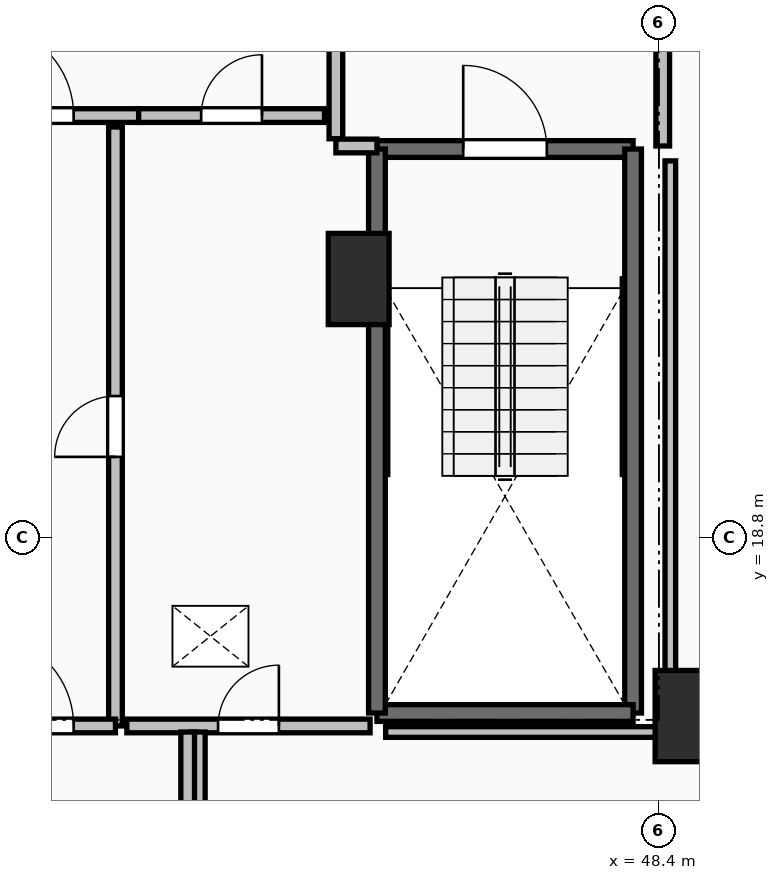
"""IFC4 building model, lengths in metres.
Left out: names, types, materials, properties, quantities, classifications, styles, units other than length and angle.
Written with IfcOpenShell. Run it as: python <this file> out.ifc"""

import sys

from ifc_helpers import new_model, si_unit, direction, frame, frame_2d, origin, origin_2d, place, context, subcontext, project, spatial, rectangle, extrude, element, fill, save


model = new_model("IFC4")
c1 = context("Model", 3, precision=1e-05, world=origin(), true_north=direction((0.0, 1.0)))
c2 = subcontext(c1, "Body", "Model", "MODEL_VIEW")
j1 = project(units=[si_unit("LENGTHUNIT", "METRE"), si_unit("PLANEANGLEUNIT", "RADIAN")], contexts=[c1])
p1 = place(None, origin())
s1 = spatial("IfcSite", under=j1, at=p1, CompositionType="ELEMENT")
p2 = place(p1, origin())
s2 = spatial("IfcBuilding", under=s1, at=p2, CompositionType="ELEMENT")
p3 = place(p2, frame((0.0, 0.0, 27.5)))
s3 = spatial("IfcBuildingStorey", under=s2, at=p3, CompositionType="ELEMENT", Elevation=27.5)
for number, where, z_axis, x_axis in (
    (1, (48.75, 16.45, 0.0), (0.0, 0.0, 1.0), (1.0, 0.0, 0.0)),
    (2, (44.45, 22.2, 0.0), (0.0, 0.0, 1.0), (1.0, 0.0, 0.0)),
):
    element("IfcColumn", number, at=place(p3, frame(where, z_axis=z_axis, x_axis=x_axis)), inside=s3, PredefinedType="PILASTER", context=c2, shape_type="SweptSolid", body=[
        extrude(rectangle(XDim=0.8, YDim=1.2, at=origin_2d()), origin(), (0.0, 0.0, 1.0), 3.5),
    ])
p4 = place(p3, frame((44.69, 23.91, 0.0), z_axis=(0.0, 0.0, 1.0), x_axis=(1.0, 0.0, 0.0)))
e3 = element("IfcWall", 3, at=p4, inside=s3, PredefinedType="SOLIDWALL", context=c2, shape_type="SweptSolid", body=[
    extrude(rectangle(XDim=3.37, YDim=0.22, at=frame_2d((1.685, 0.0))), origin(), (0.0, 0.0, 1.0), 3.24),
])
p5 = place(p4, frame((1.135, 0.0, 0.0)))
e4 = element("IfcOpeningElement", 4, at=p5, cuts=e3, PredefinedType="OPENING", context=c2, shape_type="SweptSolid", body=[
    extrude(rectangle(XDim=1.1, YDim=2.15, at=frame_2d((0.55, 1.075))), frame((0.0, 0.125, 0.0), z_axis=(0.0, -1.0, 0.0), x_axis=(1.0, 0.0, 0.0)), (0.0, 0.0, 1.0), 0.25),
])
p6 = place(p3, frame((48.06, 23.91, 0.0), z_axis=(0.0, 0.0, 1.0), x_axis=(0.0, -1.0, 0.0)))
e5 = element("IfcWall", 5, at=p6, inside=s3, PredefinedType="SOLIDWALL", context=c2, shape_type="SweptSolid", body=[
    extrude(rectangle(XDim=7.42, YDim=0.22, at=frame_2d((3.71, 0.0))), origin(), (0.0, 0.0, 1.0), 3.24),
])
p7 = place(p3, frame((48.06, 16.49, 0.0), z_axis=(0.0, 0.0, 1.0), x_axis=(-1.0, 0.0, 0.0)))
e6 = element("IfcWall", 6, at=p7, inside=s3, PredefinedType="SOLIDWALL", context=c2, shape_type="SweptSolid", body=[
    extrude(rectangle(XDim=3.37, YDim=0.22, at=frame_2d((1.685, 0.0))), origin(), (0.0, 0.0, 1.0), 3.24),
])
p8 = place(p3, frame((44.69, 16.49, 0.0), z_axis=(0.0, 0.0, 1.0), x_axis=(0.0, 1.0, 0.0)))
e7 = element("IfcWall", 7, at=p8, inside=s3, PredefinedType="SOLIDWALL", context=c2, shape_type="SweptSolid", body=[
    extrude(rectangle(XDim=7.42, YDim=0.22, at=frame_2d((3.71, 0.0))), origin(), (0.0, 0.0, 1.0), 3.24),
])
p9 = place(p3, frame((44.15, 27.955, 0.0), z_axis=(0.0, 0.0, 1.0), x_axis=(0.0, -1.0, 0.0)))
e8 = element("IfcWall", 8, at=p9, inside=s3, PredefinedType="PARTITIONING", context=c2, shape_type="SweptSolid", body=[
    extrude(rectangle(XDim=3.91, YDim=0.18, at=frame_2d((1.955, 0.0))), origin(), (0.0, 0.0, 1.0), 3.24),
])
p10 = place(p9, frame((1.355, 0.0, 0.0)))
e9 = element("IfcOpeningElement", 9, at=p10, cuts=e8, PredefinedType="OPENING", context=c2, shape_type="SweptSolid", body=[
    extrude(rectangle(XDim=1.2, YDim=2.15, at=frame_2d((0.6, 1.075))), frame((0.0, 0.105, 0.0), z_axis=(0.0, -1.0, 0.0), x_axis=(1.0, 0.0, 0.0)), (0.0, 0.0, 1.0), 0.21),
])
p11 = place(p3, frame((44.15, 23.95, 0.0), z_axis=(0.0, 0.0, 1.0), x_axis=(1.0, 0.0, 0.0)))
e10 = element("IfcWall", 10, at=p11, inside=s3, PredefinedType="PARTITIONING", context=c2, shape_type="SweptSolid", body=[
    extrude(rectangle(XDim=0.54, YDim=0.18, at=frame_2d((0.27, 0.0))), origin(), (0.0, 0.0, 1.0), 3.24),
])
p12 = place(p3, frame((48.45, 23.95, 0.0), z_axis=(0.0, 0.0, 1.0), x_axis=(0.0, 1.0, 0.0)))
e11 = element("IfcWall", 11, at=p12, inside=s3, PredefinedType="PARTITIONING", context=c2, shape_type="SweptSolid", body=[
    extrude(rectangle(XDim=4.05, YDim=0.18, at=frame_2d((2.025, 0.0))), origin(), (0.0, 0.0, 1.0), 3.24),
])
p13 = place(p12, frame((1.425, 0.0, 0.0)))
e12 = element("IfcOpeningElement", 12, at=p13, cuts=e11, PredefinedType="OPENING", context=c2, shape_type="SweptSolid", body=[
    extrude(rectangle(XDim=1.2, YDim=2.15, at=frame_2d((0.6, 1.075))), frame((0.0, 0.105, 0.0), z_axis=(0.0, -1.0, 0.0), x_axis=(1.0, 0.0, 0.0)), (0.0, 0.0, 1.0), 0.21),
])
p14 = place(p3, frame((38.645, 24.35, 0.0), z_axis=(0.0, 0.0, 1.0), x_axis=(1.0, 0.0, 0.0)))
e13 = element("IfcWall", 13, at=p14, inside=s3, PredefinedType="PARTITIONING", context=c2, shape_type="SweptSolid", body=[
    extrude(rectangle(XDim=2.91, YDim=0.18, at=frame_2d((1.455, 0.0))), origin(), (0.0, 0.0, 1.0), 3.24),
])
p15 = place(p14, frame((0.855, 0.0, 0.0)))
e14 = element("IfcOpeningElement", 14, at=p15, cuts=e13, PredefinedType="OPENING", context=c2, shape_type="SweptSolid", body=[
    extrude(rectangle(XDim=1.2, YDim=2.15, at=frame_2d((0.6, 1.075))), frame((0.0, 0.105, 0.0), z_axis=(0.0, -1.0, 0.0), x_axis=(1.0, 0.0, 0.0)), (0.0, 0.0, 1.0), 0.21),
])
p16 = place(p3, frame((41.555, 24.35, 0.0), z_axis=(0.0, 0.0, 1.0), x_axis=(1.0, 0.0, 0.0)))
e15 = element("IfcWall", 15, at=p16, inside=s3, PredefinedType="PARTITIONING", context=c2, shape_type="SweptSolid", body=[
    extrude(rectangle(XDim=2.445, YDim=0.18, at=frame_2d((1.223, 0.0))), origin(), (0.0, 0.0, 1.0), 3.24),
])
p17 = place(p16, frame((0.823, 0.0, 0.0)))
e16 = element("IfcOpeningElement", 16, at=p17, cuts=e15, PredefinedType="OPENING", context=c2, shape_type="SweptSolid", body=[
    extrude(rectangle(XDim=0.8, YDim=2.05, at=frame_2d((0.4, 1.025))), frame((0.0, 0.105, 0.0), z_axis=(0.0, -1.0, 0.0), x_axis=(1.0, 0.0, 0.0)), (0.0, 0.0, 1.0), 0.21),
])
p18 = place(p3, frame((41.25, 16.32, 0.0), z_axis=(0.0, 0.0, 1.0), x_axis=(0.0, 1.0, 0.0)))
e17 = element("IfcWall", 17, at=p18, inside=s3, PredefinedType="PARTITIONING", context=c2, shape_type="SweptSolid", body=[
    extrude(rectangle(XDim=7.88, YDim=0.18, at=frame_2d((3.94, 0.0))), origin(), (0.0, 0.0, 1.0), 3.24),
])
p19 = place(p18, frame((3.54, 0.0, 0.0)))
e18 = element("IfcOpeningElement", 18, at=p19, cuts=e17, PredefinedType="OPENING", context=c2, shape_type="SweptSolid", body=[
    extrude(rectangle(XDim=0.8, YDim=2.05, at=frame_2d((0.4, 1.025))), frame((0.0, 0.105, 0.0), z_axis=(0.0, -1.0, 0.0), x_axis=(1.0, 0.0, 0.0)), (0.0, 0.0, 1.0), 0.21),
])
p20 = place(p3, frame((38.95, 16.32, 0.0), z_axis=(0.0, 0.0, 1.0), x_axis=(1.0, 0.0, 0.0)))
e19 = element("IfcWall", 19, at=p20, inside=s3, PredefinedType="PARTITIONING", context=c2, shape_type="SweptSolid", body=[
    extrude(rectangle(XDim=2.3, YDim=0.18, at=frame_2d((1.15, 0.0))), origin(), (0.0, 0.0, 1.0), 3.24),
])
p21 = place(p20, frame((0.55, 0.0, 0.0)))
e20 = element("IfcOpeningElement", 20, at=p21, cuts=e19, PredefinedType="OPENING", context=c2, shape_type="SweptSolid", body=[
    extrude(rectangle(XDim=1.2, YDim=2.15, at=frame_2d((0.6, 1.075))), frame((0.0, 0.105, 0.0), z_axis=(0.0, -1.0, 0.0), x_axis=(1.0, 0.0, 0.0)), (0.0, 0.0, 1.0), 0.21),
])
p22 = place(p3, frame((41.4, 16.32, 0.0), z_axis=(0.0, 0.0, 1.0), x_axis=(1.0, 0.0, 0.0)))
e21 = element("IfcWall", 21, at=p22, inside=s3, PredefinedType="PARTITIONING", context=c2, shape_type="SweptSolid", body=[
    extrude(rectangle(XDim=3.2, YDim=0.18, at=frame_2d((1.6, 0.0))), origin(), (0.0, 0.0, 1.0), 3.24),
])
p23 = place(p22, frame((1.2, 0.0, 0.0)))
e22 = element("IfcOpeningElement", 22, at=p23, cuts=e21, PredefinedType="OPENING", context=c2, shape_type="SweptSolid", body=[
    extrude(rectangle(XDim=0.8, YDim=2.05, at=frame_2d((0.4, 1.025))), frame((0.0, 0.105, 0.0), z_axis=(0.0, -1.0, 0.0), x_axis=(1.0, 0.0, 0.0)), (0.0, 0.0, 1.0), 0.21),
])
p24 = place(p3, frame((42.34, 16.24, 0.0), z_axis=(0.0, 0.0, 1.0), x_axis=(0.0, -1.0, 0.0)))
e23 = element("IfcWall", 23, at=p24, inside=s3, PredefinedType="PARTITIONING", context=c2, shape_type="SweptSolid", body=[
    extrude(rectangle(XDim=2.14, YDim=0.18, at=frame_2d((1.07, 0.0))), origin(), (0.0, 0.0, 1.0), 3.24),
])
p25 = place(p3, frame((42.2, 14.157, 0.0), z_axis=(0.0, 0.0, 1.0), x_axis=(0.0, 1.0, 0.0)))
e24 = element("IfcWall", 24, at=p25, inside=s3, PredefinedType="PARTITIONING", context=c2, shape_type="SweptSolid", body=[
    extrude(rectangle(XDim=2.083, YDim=0.18, at=frame_2d((1.042, 0.0))), origin(), (0.0, 0.0, 1.0), 3.24),
])
p26 = place(p3, frame((48.55, 23.754, 0.0), z_axis=(0.0, 0.0, 1.0), x_axis=(0.0, -1.0, 0.0)))
e25 = element("IfcWall", 25, at=p26, inside=s3, PredefinedType="PARTITIONING", context=c2, shape_type="SweptSolid", body=[
    extrude(rectangle(XDim=7.514, YDim=0.14, at=frame_2d((3.757, 0.0))), origin(), (0.0, 0.0, 1.0), 2.432),
])
p27 = place(p3, frame((48.55, 16.24, 0.0), z_axis=(0.0, 0.0, 1.0), x_axis=(-1.0, 0.0, 0.0)))
e26 = element("IfcWall", 26, at=p27, inside=s3, PredefinedType="PARTITIONING", context=c2, shape_type="SweptSolid", body=[
    extrude(rectangle(XDim=3.745, YDim=0.14, at=frame_2d((1.873, 0.0))), origin(), (0.0, 0.0, 1.0), 2.432),
])
p28 = place(p5, origin())
e27 = element("IfcDoor", 27, at=p28, inside=s3, OperationType="SINGLE_SWING_LEFT", PredefinedType="DOOR", context=c2, shape_type="SweptSolid", body=[
    extrude(rectangle(XDim=1.1, YDim=2.15, at=frame_2d((0.55, 1.075))), frame((0.0, 0.025, 0.0), z_axis=(0.0, -1.0, 0.0), x_axis=(1.0, 0.0, 0.0)), (0.0, 0.0, 1.0), 0.05),
])
fill(e4, e27)
p29 = place(p15, origin())
e28 = element("IfcDoor", 28, at=p29, inside=s3, OperationType="SINGLE_SWING_LEFT", PredefinedType="DOOR", context=c2, shape_type="SweptSolid", body=[
    extrude(rectangle(XDim=1.2, YDim=2.15, at=frame_2d((0.6, 1.075))), frame((0.0, 0.025, 0.0), z_axis=(0.0, -1.0, 0.0), x_axis=(1.0, 0.0, 0.0)), (0.0, 0.0, 1.0), 0.05),
])
fill(e14, e28)
p30 = place(p17, origin())
e29 = element("IfcDoor", 29, at=p30, inside=s3, OperationType="SINGLE_SWING_RIGHT", PredefinedType="DOOR", context=c2, shape_type="SweptSolid", body=[
    extrude(rectangle(XDim=0.8, YDim=2.05, at=frame_2d((0.4, 1.025))), frame((0.0, 0.025, 0.0), z_axis=(0.0, -1.0, 0.0), x_axis=(1.0, 0.0, 0.0)), (0.0, 0.0, 1.0), 0.05),
])
fill(e16, e29)
p31 = place(p19, origin())
e30 = element("IfcDoor", 30, at=p31, inside=s3, OperationType="SINGLE_SWING_LEFT", PredefinedType="DOOR", context=c2, shape_type="SweptSolid", body=[
    extrude(rectangle(XDim=0.8, YDim=2.05, at=frame_2d((0.4, 1.025))), frame((0.0, 0.025, 0.0), z_axis=(0.0, -1.0, 0.0), x_axis=(1.0, 0.0, 0.0)), (0.0, 0.0, 1.0), 0.05),
])
fill(e18, e30)
p32 = place(p21, origin())
e31 = element("IfcDoor", 31, at=p32, inside=s3, OperationType="SINGLE_SWING_LEFT", PredefinedType="DOOR", context=c2, shape_type="SweptSolid", body=[
    extrude(rectangle(XDim=1.2, YDim=2.15, at=frame_2d((0.6, 1.075))), frame((0.0, 0.025, 0.0), z_axis=(0.0, -1.0, 0.0), x_axis=(1.0, 0.0, 0.0)), (0.0, 0.0, 1.0), 0.05),
])
fill(e20, e31)
p33 = place(p23, origin())
e32 = element("IfcDoor", 32, at=p33, inside=s3, OperationType="SINGLE_SWING_RIGHT", PredefinedType="DOOR", context=c2, shape_type="SweptSolid", body=[
    extrude(rectangle(XDim=0.8, YDim=2.05, at=frame_2d((0.4, 1.025))), frame((0.0, 0.025, 0.0), z_axis=(0.0, -1.0, 0.0), x_axis=(1.0, 0.0, 0.0)), (0.0, 0.0, 1.0), 0.05),
])
fill(e22, e32)
save(model, sys.argv[1])
